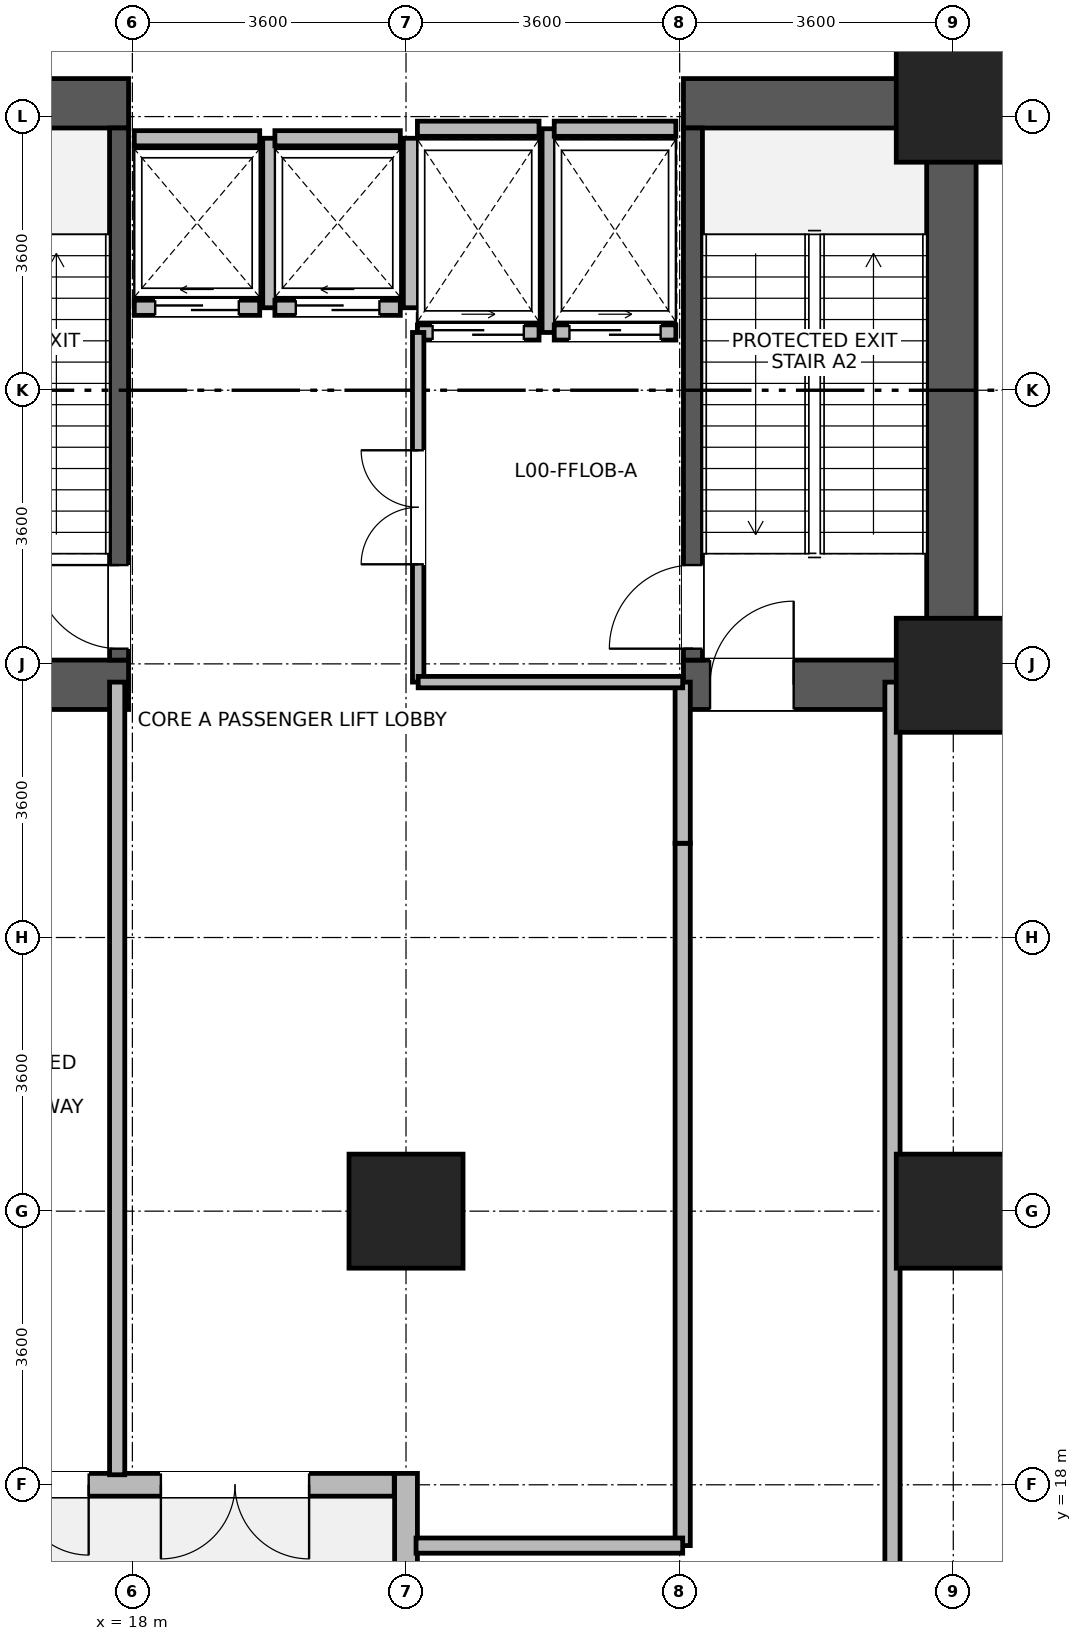
"""IFC4 building model, lengths in metres.
Left out: names, types, materials, properties, quantities, classifications, styles, units other than length and angle.
Written with IfcOpenShell. Run it as: python <this file> out.ifc"""

import sys

from ifc_helpers import new_model, si_unit, direction, frame, frame_2d, origin, origin_2d, place, context, subcontext, project, spatial, rectangle, extrude, source, transform, mapped, element, fill, save


model = new_model("IFC4")
c1 = context("Model", 3, precision=1e-05, world=origin(), true_north=direction((0.0, 1.0)))
c2 = subcontext(c1, "Body", "Model", "MODEL_VIEW")
j1 = project(units=[si_unit("LENGTHUNIT", "METRE"), si_unit("PLANEANGLEUNIT", "RADIAN")], contexts=[c1])
p1 = place(None, origin())
s1 = spatial("IfcSite", under=j1, at=p1, CompositionType="ELEMENT")
p2 = place(p1, origin())
s2 = spatial("IfcBuilding", under=s1, at=p2, CompositionType="ELEMENT")
p3 = place(p2, origin())
s3 = spatial("IfcBuildingStorey", under=s2, at=p3, CompositionType="ELEMENT", Elevation=0.0)
p4 = place(p3, frame((28.775, 28.2, 0.0), z_axis=(0.0, 0.0, 1.0), x_axis=(0.0, 1.0, 0.0)))
e1 = element("IfcWall", 1, at=p4, inside=s3, PredefinedType="SHEAR", context=c2, shape_type="SweptSolid", body=[
    extrude(rectangle(XDim=8.3, YDim=0.65, at=frame_2d((4.15, 0.0))), origin(), (0.0, 0.0, 1.0), 5.12),
])
p5 = place(p3, frame((14.75, 28.525, 0.0), z_axis=(0.0, 0.0, 1.0), x_axis=(1.0, 0.0, 0.0)))
e2 = element("IfcWall", 2, at=p5, inside=s3, PredefinedType="SHEAR", context=c2, shape_type="SweptSolid", body=[
    extrude(rectangle(XDim=3.2, YDim=0.65, at=frame_2d((1.6, 0.0))), origin(), (0.0, 0.0, 1.0), 5.12),
])
p6 = place(p5, frame((0.85, 0.0, 0.0)))
e3 = element("IfcOpeningElement", 3, at=p6, cuts=e2, PredefinedType="OPENING", context=c2, shape_type="SweptSolid", body=[
    extrude(rectangle(XDim=1.1, YDim=2.08, at=frame_2d((0.55, 1.04))), frame((0.0, 0.335, 0.0), z_axis=(0.0, -1.0, 0.0), x_axis=(1.0, 0.0, 0.0)), (0.0, 0.0, 1.0), 0.67),
])
p7 = place(p3, frame((25.25, 28.525, 0.0), z_axis=(0.0, 0.0, 1.0), x_axis=(1.0, 0.0, 0.0)))
e4 = element("IfcWall", 4, at=p7, inside=s3, PredefinedType="SHEAR", context=c2, shape_type="SweptSolid", body=[
    extrude(rectangle(XDim=3.2, YDim=0.65, at=frame_2d((1.6, 0.0))), origin(), (0.0, 0.0, 1.0), 5.12),
])
p8 = place(p7, frame((0.35, 0.0, 0.0)))
e5 = element("IfcOpeningElement", 5, at=p8, cuts=e4, PredefinedType="OPENING", context=c2, shape_type="SweptSolid", body=[
    extrude(rectangle(XDim=1.1, YDim=2.08, at=frame_2d((0.55, 1.04))), frame((0.0, 0.335, 0.0), z_axis=(0.0, -1.0, 0.0), x_axis=(1.0, 0.0, 0.0)), (0.0, 0.0, 1.0), 0.67),
])
for number, where, z_axis, x_axis in (
    (6, (14.75, 36.175, 0.0), (0.0, 0.0, 1.0), (1.0, 0.0, 0.0)),
    (7, (25.25, 36.175, 0.0), (0.0, 0.0, 1.0), (1.0, 0.0, 0.0)),
):
    element("IfcWall", number, at=place(p3, frame(where, z_axis=z_axis, x_axis=x_axis)), inside=s3, PredefinedType="SHEAR", context=c2, shape_type="SweptSolid", body=[
        extrude(rectangle(XDim=3.2, YDim=0.65, at=frame_2d((1.6, 0.0))), origin(), (0.0, 0.0, 1.0), 5.12),
    ])
p9 = place(p3, frame((17.825, 28.85, 0.0), z_axis=(0.0, 0.0, 1.0), x_axis=(0.0, 1.0, 0.0)))
e8 = element("IfcWall", 8, at=p9, inside=s3, PredefinedType="SHEAR", context=c2, shape_type="SweptSolid", body=[
    extrude(rectangle(XDim=7.0, YDim=0.25, at=frame_2d((3.5, 0.0))), origin(), (0.0, 0.0, 1.0), 5.12),
])
p10 = place(p9, frame((0.15, 0.0, 0.0)))
e9 = element("IfcOpeningElement", 9, at=p10, cuts=e8, PredefinedType="OPENING", context=c2, shape_type="SweptSolid", body=[
    extrude(rectangle(XDim=1.1, YDim=2.08, at=frame_2d((0.55, 1.04))), frame((0.0, 0.135, 0.0), z_axis=(0.0, -1.0, 0.0), x_axis=(1.0, 0.0, 0.0)), (0.0, 0.0, 1.0), 0.27),
])
p11 = place(p3, frame((25.375, 28.85, 0.0), z_axis=(0.0, 0.0, 1.0), x_axis=(0.0, 1.0, 0.0)))
e10 = element("IfcWall", 10, at=p11, inside=s3, PredefinedType="SHEAR", context=c2, shape_type="SweptSolid", body=[
    extrude(rectangle(XDim=7.0, YDim=0.25, at=frame_2d((3.5, 0.0))), origin(), (0.0, 0.0, 1.0), 5.12),
])
p12 = place(p11, frame((0.15, 0.0, 0.0)))
e11 = element("IfcOpeningElement", 11, at=p12, cuts=e10, PredefinedType="OPENING", context=c2, shape_type="SweptSolid", body=[
    extrude(rectangle(XDim=1.1, YDim=2.08, at=frame_2d((0.55, 1.04))), frame((0.0, 0.135, 0.0), z_axis=(0.0, -1.0, 0.0), x_axis=(1.0, 0.0, 0.0)), (0.0, 0.0, 1.0), 0.27),
])
m1 = source(origin(), c2, "Body", "SweptSolid", [
    extrude(rectangle(XDim=1.5, YDim=1.5, at=origin_2d()), origin(), (0.0, 0.0, 1.0), 5.4),
])
for number, where, z_axis, x_axis in (
    (12, (21.6, 21.6, 0.0), (0.0, 0.0, 1.0), (1.0, 0.0, 0.0)),
    (13, (28.8, 21.6, 0.0), (0.0, 0.0, 1.0), (1.0, 0.0, 0.0)),
    (14, (28.8, 28.65, 0.0), (0.0, 0.0, 1.0), (1.0, 0.0, 0.0)),
    (15, (28.8, 36.15, 0.0), (0.0, 0.0, 1.0), (1.0, 0.0, 0.0)),
):
    element("IfcColumn", number, at=place(p3, frame(where, z_axis=z_axis, x_axis=x_axis)), inside=s3, PredefinedType="COLUMN", context=c2, shape_type="MappedRepresentation", body=[
        mapped(m1, transform((0.0, 0.0, 0.0), x_axis=(1.0, 0.0, 0.0), y_axis=(0.0, 1.0, 0.0), z_axis=(0.0, 0.0, 1.0), scale=1.0)),
    ])
p13 = place(p3, frame((21.445, 18.0, 0.0), z_axis=(0.0, 0.0, 1.0), x_axis=(-1.0, 0.0, 0.0)))
e16 = element("IfcWall", 16, at=p13, inside=s3, PredefinedType="STANDARD", context=c2, shape_type="SweptSolid", body=[
    extrude(rectangle(XDim=20.294, YDim=0.3, at=frame_2d((10.147, 0.0))), origin(), (0.0, 0.0, 1.0), 5.1),
])
p14 = place(p13, frame((4.02, 0.0, 0.0)))
e17 = element("IfcOpeningElement", 17, at=p14, cuts=e16, PredefinedType="OPENING", context=c2, shape_type="SweptSolid", body=[
    extrude(rectangle(XDim=1.85, YDim=2.25, at=frame_2d((0.925, 1.125))), frame((0.0, 0.16, 0.0), z_axis=(0.0, -1.0, 0.0), x_axis=(1.0, 0.0, 0.0)), (0.0, 0.0, 1.0), 0.32),
])
p15 = place(p13, frame((1.12, 0.0, 0.0)))
e18 = element("IfcOpeningElement", 18, at=p15, cuts=e16, PredefinedType="OPENING", context=c2, shape_type="SweptSolid", body=[
    extrude(rectangle(XDim=1.95, YDim=2.4, at=frame_2d((0.975, 1.2))), frame((0.0, 0.16, 0.0), z_axis=(0.0, -1.0, 0.0), x_axis=(1.0, 0.0, 0.0)), (0.0, 0.0, 1.0), 0.32),
])
p16 = place(p13, frame((7.256, 0.0, 0.9)))
e19 = element("IfcOpeningElement", 19, at=p16, cuts=e16, PredefinedType="OPENING", context=c2, shape_type="SweptSolid", body=[
    extrude(rectangle(XDim=2.4, YDim=2.5, at=frame_2d((1.2, 1.25))), frame((0.0, 0.16, 0.0), z_axis=(0.0, -1.0, 0.0), x_axis=(1.0, 0.0, 0.0)), (0.0, 0.0, 1.0), 0.32),
])
p17 = place(p13, frame((14.021, 0.0, 0.9)))
e20 = element("IfcOpeningElement", 20, at=p17, cuts=e16, PredefinedType="OPENING", context=c2, shape_type="SweptSolid", body=[
    extrude(rectangle(XDim=2.4, YDim=2.5, at=frame_2d((1.2, 1.25))), frame((0.0, 0.16, 0.0), z_axis=(0.0, -1.0, 0.0), x_axis=(1.0, 0.0, 0.0)), (0.0, 0.0, 1.0), 0.32),
])
p18 = place(p13, frame((17.403, 0.0, 0.9)))
e21 = element("IfcOpeningElement", 21, at=p18, cuts=e16, PredefinedType="OPENING", context=c2, shape_type="SweptSolid", body=[
    extrude(rectangle(XDim=2.4, YDim=2.5, at=frame_2d((1.2, 1.25))), frame((0.0, 0.16, 0.0), z_axis=(0.0, -1.0, 0.0), x_axis=(1.0, 0.0, 0.0)), (0.0, 0.0, 1.0), 0.32),
])
p19 = place(p3, frame((21.6, 1.65, 0.0), z_axis=(0.0, 0.0, 1.0), x_axis=(0.0, 1.0, 0.0)))
e22 = element("IfcWall", 22, at=p19, inside=s3, PredefinedType="STANDARD", context=c2, shape_type="SweptSolid", body=[
    extrude(rectangle(XDim=16.5, YDim=0.3, at=frame_2d((8.25, 0.0))), origin(), (0.0, 0.0, 1.0), 5.1),
])
p20 = place(p19, frame((13.125, 0.0, 0.0)))
e23 = element("IfcOpeningElement", 23, at=p20, cuts=e22, PredefinedType="OPENING", context=c2, shape_type="SweptSolid", body=[
    extrude(rectangle(XDim=1.85, YDim=2.25, at=frame_2d((0.925, 1.125))), frame((0.0, 0.16, 0.0), z_axis=(0.0, -1.0, 0.0), x_axis=(1.0, 0.0, 0.0)), (0.0, 0.0, 1.0), 0.32),
])
p21 = place(p19, frame((0.45, 0.0, 0.9)))
e24 = element("IfcOpeningElement", 24, at=p21, cuts=e22, PredefinedType="OPENING", context=c2, shape_type="SweptSolid", body=[
    extrude(rectangle(XDim=2.4, YDim=2.5, at=frame_2d((1.2, 1.25))), frame((0.0, 0.16, 0.0), z_axis=(0.0, -1.0, 0.0), x_axis=(1.0, 0.0, 0.0)), (0.0, 0.0, 1.0), 0.32),
])
p22 = place(p19, frame((7.05, 0.0, 0.9)))
e25 = element("IfcOpeningElement", 25, at=p22, cuts=e22, PredefinedType="OPENING", context=c2, shape_type="SweptSolid", body=[
    extrude(rectangle(XDim=2.4, YDim=2.5, at=frame_2d((1.2, 1.25))), frame((0.0, 0.16, 0.0), z_axis=(0.0, -1.0, 0.0), x_axis=(1.0, 0.0, 0.0)), (0.0, 0.0, 1.0), 0.32),
])
p23 = place(p3, frame((18.025, 33.485, 0.0), z_axis=(0.0, 0.0, 1.0), x_axis=(1.0, 0.0, 0.0)))
e26 = element("IfcWall", 26, at=p23, inside=s3, PredefinedType="PARTITIONING", context=c2, shape_type="SweptSolid", body=[
    extrude(rectangle(XDim=1.65, YDim=0.2, at=frame_2d((0.825, 0.0))), origin(), (0.0, 0.0, 1.0), 5.1),
])
p24 = place(p23, frame((0.275, 0.0, 0.0)))
e27 = element("IfcOpeningElement", 27, at=p24, cuts=e26, PredefinedType="OPENING", context=c2, shape_type="SweptSolid", body=[
    extrude(rectangle(XDim=1.1, YDim=2.12, at=frame_2d((0.55, 1.06))), frame((0.0, 0.11, 0.0), z_axis=(0.0, -1.0, 0.0), x_axis=(1.0, 0.0, 0.0)), (0.0, 0.0, 1.0), 0.22),
])
p25 = place(p3, frame((18.025, 35.715, 0.0), z_axis=(0.0, 0.0, 1.0), x_axis=(1.0, 0.0, 0.0)))
e28 = element("IfcWall", 28, at=p25, inside=s3, PredefinedType="PARTITIONING", context=c2, shape_type="SweptSolid", body=[
    extrude(rectangle(XDim=1.65, YDim=0.2, at=frame_2d((0.825, 0.0))), origin(), (0.0, 0.0, 1.0), 5.1),
])
p26 = place(p3, frame((19.815, 33.485, 0.0), z_axis=(0.0, 0.0, 1.0), x_axis=(0.0, 1.0, 0.0)))
e29 = element("IfcWall", 29, at=p26, inside=s3, PredefinedType="PARTITIONING", context=c2, shape_type="SweptSolid", body=[
    extrude(rectangle(XDim=2.23, YDim=0.2, at=frame_2d((1.115, 0.0))), origin(), (0.0, 0.0, 1.0), 5.1),
])
p27 = place(p3, frame((19.875, 33.485, 0.0), z_axis=(0.0, 0.0, 1.0), x_axis=(1.0, 0.0, 0.0)))
e30 = element("IfcWall", 30, at=p27, inside=s3, PredefinedType="PARTITIONING", context=c2, shape_type="SweptSolid", body=[
    extrude(rectangle(XDim=1.65, YDim=0.2, at=frame_2d((0.825, 0.0))), origin(), (0.0, 0.0, 1.0), 5.1),
])
p28 = place(p27, frame((0.275, 0.0, 0.0)))
e31 = element("IfcOpeningElement", 31, at=p28, cuts=e30, PredefinedType="OPENING", context=c2, shape_type="SweptSolid", body=[
    extrude(rectangle(XDim=1.1, YDim=2.12, at=frame_2d((0.55, 1.06))), frame((0.0, 0.11, 0.0), z_axis=(0.0, -1.0, 0.0), x_axis=(1.0, 0.0, 0.0)), (0.0, 0.0, 1.0), 0.22),
])
p29 = place(p3, frame((19.875, 35.715, 0.0), z_axis=(0.0, 0.0, 1.0), x_axis=(1.0, 0.0, 0.0)))
e32 = element("IfcWall", 32, at=p29, inside=s3, PredefinedType="PARTITIONING", context=c2, shape_type="SweptSolid", body=[
    extrude(rectangle(XDim=1.65, YDim=0.2, at=frame_2d((0.825, 0.0))), origin(), (0.0, 0.0, 1.0), 5.1),
])
p30 = place(p3, frame((21.665, 33.485, 0.0), z_axis=(0.0, 0.0, 1.0), x_axis=(0.0, 1.0, 0.0)))
e33 = element("IfcWall", 33, at=p30, inside=s3, PredefinedType="PARTITIONING", context=c2, shape_type="SweptSolid", body=[
    extrude(rectangle(XDim=2.23, YDim=0.2, at=frame_2d((1.115, 0.0))), origin(), (0.0, 0.0, 1.0), 5.1),
])
p31 = place(p3, frame((21.75, 33.16, 0.0), z_axis=(0.0, 0.0, 1.0), x_axis=(1.0, 0.0, 0.0)))
e34 = element("IfcWall", 34, at=p31, inside=s3, PredefinedType="PARTITIONING", context=c2, shape_type="SweptSolid", body=[
    extrude(rectangle(XDim=1.6, YDim=0.2, at=frame_2d((0.8, 0.0))), origin(), (0.0, 0.0, 1.0), 5.1),
])
p32 = place(p31, frame((0.2, 0.0, 0.0)))
e35 = element("IfcOpeningElement", 35, at=p32, cuts=e34, PredefinedType="OPENING", context=c2, shape_type="SweptSolid", body=[
    extrude(rectangle(XDim=1.2, YDim=2.12, at=frame_2d((0.6, 1.06))), frame((0.0, 0.11, 0.0), z_axis=(0.0, -1.0, 0.0), x_axis=(1.0, 0.0, 0.0)), (0.0, 0.0, 1.0), 0.22),
])
p33 = place(p3, frame((21.75, 35.84, 0.0), z_axis=(0.0, 0.0, 1.0), x_axis=(1.0, 0.0, 0.0)))
e36 = element("IfcWall", 36, at=p33, inside=s3, PredefinedType="PARTITIONING", context=c2, shape_type="SweptSolid", body=[
    extrude(rectangle(XDim=1.6, YDim=0.2, at=frame_2d((0.8, 0.0))), origin(), (0.0, 0.0, 1.0), 3.9),
])
p34 = place(p3, frame((23.49, 33.16, 0.0), z_axis=(0.0, 0.0, 1.0), x_axis=(0.0, 1.0, 0.0)))
e37 = element("IfcWall", 37, at=p34, inside=s3, PredefinedType="PARTITIONING", context=c2, shape_type="SweptSolid", body=[
    extrude(rectangle(XDim=2.68, YDim=0.2, at=frame_2d((1.34, 0.0))), origin(), (0.0, 0.0, 1.0), 5.1),
])
p35 = place(p3, frame((23.55, 33.16, 0.0), z_axis=(0.0, 0.0, 1.0), x_axis=(1.0, 0.0, 0.0)))
e38 = element("IfcWall", 38, at=p35, inside=s3, PredefinedType="PARTITIONING", context=c2, shape_type="SweptSolid", body=[
    extrude(rectangle(XDim=1.6, YDim=0.2, at=frame_2d((0.8, 0.0))), origin(), (0.0, 0.0, 1.0), 5.1),
])
p36 = place(p35, frame((0.2, 0.0, 0.0)))
e39 = element("IfcOpeningElement", 39, at=p36, cuts=e38, PredefinedType="OPENING", context=c2, shape_type="SweptSolid", body=[
    extrude(rectangle(XDim=1.2, YDim=2.12, at=frame_2d((0.6, 1.06))), frame((0.0, 0.11, 0.0), z_axis=(0.0, -1.0, 0.0), x_axis=(1.0, 0.0, 0.0)), (0.0, 0.0, 1.0), 0.22),
])
p37 = place(p3, frame((23.55, 35.84, 0.0), z_axis=(0.0, 0.0, 1.0), x_axis=(1.0, 0.0, 0.0)))
e40 = element("IfcWall", 40, at=p37, inside=s3, PredefinedType="PARTITIONING", context=c2, shape_type="SweptSolid", body=[
    extrude(rectangle(XDim=1.6, YDim=0.2, at=frame_2d((0.8, 0.0))), origin(), (0.0, 0.0, 1.0), 3.9),
])
p38 = place(p3, frame((28.0, 14.2, 0.0), z_axis=(0.0, 0.0, 1.0), x_axis=(0.0, 1.0, 0.0)))
e41 = element("IfcWall", 41, at=p38, inside=s3, PredefinedType="PARTITIONING", context=c2, shape_type="SweptSolid", body=[
    extrude(rectangle(XDim=14.36, YDim=0.2, at=frame_2d((7.18, 0.0))), origin(), (0.0, 0.0, 1.0), 5.1),
])
p39 = place(p3, frame((17.8, 18.132, 0.0), z_axis=(0.0, 0.0, 1.0), x_axis=(0.0, 1.0, 0.0)))
e42 = element("IfcWall", 42, at=p39, inside=s3, PredefinedType="PARTITIONING", context=c2, shape_type="SweptSolid", body=[
    extrude(rectangle(XDim=10.428, YDim=0.2, at=frame_2d((5.214, 0.0))), origin(), (0.0, 0.0, 1.0), 5.1),
])
p40 = place(p3, frame((25.24, 17.2, 0.0), z_axis=(0.0, 0.0, 1.0), x_axis=(0.0, 1.0, 0.0)))
e43 = element("IfcWall", 43, at=p40, inside=s3, PredefinedType="PARTITIONING", context=c2, shape_type="SweptSolid", body=[
    extrude(rectangle(XDim=9.24, YDim=0.2, at=frame_2d((4.62, 0.0))), origin(), (0.0, 0.0, 1.0), 5.1),
])
p41 = place(p3, frame((21.732, 17.2, 0.0), z_axis=(0.0, 0.0, 1.0), x_axis=(1.0, 0.0, 0.0)))
e44 = element("IfcWall", 44, at=p41, inside=s3, PredefinedType="PARTITIONING", context=c2, shape_type="SweptSolid", body=[
    extrude(rectangle(XDim=3.508, YDim=0.2, at=frame_2d((1.754, 0.0))), origin(), (0.0, 0.0, 1.0), 5.1),
])
p42 = place(p3, frame((25.24, 26.44, 0.0), z_axis=(0.0, 0.0, 1.0), x_axis=(0.0, 1.0, 0.0)))
e45 = element("IfcWall", 45, at=p42, inside=s3, PredefinedType="PARTITIONING", context=c2, shape_type="SweptSolid", body=[
    extrude(rectangle(XDim=2.12, YDim=0.2, at=frame_2d((1.06, 0.0))), origin(), (0.0, 0.0, 1.0), 5.1),
])
p43 = place(p3, frame((21.76, 28.56, 0.0), z_axis=(0.0, 0.0, 1.0), x_axis=(0.0, 1.0, 0.0)))
e46 = element("IfcWall", 46, at=p43, inside=s3, PredefinedType="PARTITIONING", context=c2, shape_type="SweptSolid", body=[
    extrude(rectangle(XDim=4.6, YDim=0.15, at=frame_2d((2.3, 0.0))), origin(), (0.0, 0.0, 1.0), 5.1),
])
p44 = place(p43, frame((1.55, 0.0, 0.0)))
e47 = element("IfcOpeningElement", 47, at=p44, cuts=e46, PredefinedType="OPENING", context=c2, shape_type="SweptSolid", body=[
    extrude(rectangle(XDim=1.5, YDim=2.1, at=frame_2d((0.75, 1.05))), frame((0.0, 0.085, 0.0), z_axis=(0.0, -1.0, 0.0), x_axis=(1.0, 0.0, 0.0)), (0.0, 0.0, 1.0), 0.17),
])
p45 = place(p3, frame((21.76, 28.56, 0.0), z_axis=(0.0, 0.0, 1.0), x_axis=(1.0, 0.0, 0.0)))
e48 = element("IfcWall", 48, at=p45, inside=s3, PredefinedType="PARTITIONING", context=c2, shape_type="SweptSolid", body=[
    extrude(rectangle(XDim=3.48, YDim=0.15, at=frame_2d((1.74, 0.0))), origin(), (0.0, 0.0, 1.0), 3.9),
])
p46 = place(p14, origin())
e49 = element("IfcDoor", 49, at=p46, inside=s3, OperationType="DOUBLE_DOOR_SINGLE_SWING", PredefinedType="DOOR", context=c2, shape_type="SweptSolid", body=[
    extrude(rectangle(XDim=1.85, YDim=2.25, at=frame_2d((0.925, 1.125))), frame((0.0, 0.025, 0.0), z_axis=(0.0, -1.0, 0.0), x_axis=(1.0, 0.0, 0.0)), (0.0, 0.0, 1.0), 0.05),
])
fill(e17, e49)
p47 = place(p15, origin())
e50 = element("IfcDoor", 50, at=p47, inside=s3, OperationType="DOUBLE_DOOR_SINGLE_SWING", PredefinedType="DOOR", context=c2, shape_type="SweptSolid", body=[
    extrude(rectangle(XDim=1.95, YDim=2.4, at=frame_2d((0.975, 1.2))), frame((0.0, 0.025, 0.0), z_axis=(0.0, -1.0, 0.0), x_axis=(1.0, 0.0, 0.0)), (0.0, 0.0, 1.0), 0.05),
])
fill(e18, e50)
p48 = place(p10, origin())
e51 = element("IfcDoor", 51, at=p48, inside=s3, OperationType="SINGLE_SWING_RIGHT", PredefinedType="DOOR", context=c2, shape_type="SweptSolid", body=[
    extrude(rectangle(XDim=1.1, YDim=2.08, at=frame_2d((0.55, 1.04))), frame((0.0, 0.025, 0.0), z_axis=(0.0, -1.0, 0.0), x_axis=(1.0, 0.0, 0.0)), (0.0, 0.0, 1.0), 0.05),
])
fill(e9, e51)
p49 = place(p12, origin())
e52 = element("IfcDoor", 52, at=p49, inside=s3, OperationType="SINGLE_SWING_LEFT", PredefinedType="DOOR", context=c2, shape_type="SweptSolid", body=[
    extrude(rectangle(XDim=1.1, YDim=2.08, at=frame_2d((0.55, 1.04))), frame((0.0, 0.025, 0.0), z_axis=(0.0, -1.0, 0.0), x_axis=(1.0, 0.0, 0.0)), (0.0, 0.0, 1.0), 0.05),
])
fill(e11, e52)
p50 = place(p8, origin())
e53 = element("IfcDoor", 53, at=p50, inside=s3, OperationType="SINGLE_SWING_RIGHT", PredefinedType="DOOR", context=c2, shape_type="SweptSolid", body=[
    extrude(rectangle(XDim=1.1, YDim=2.08, at=frame_2d((0.55, 1.04))), frame((0.0, 0.025, 0.0), z_axis=(0.0, -1.0, 0.0), x_axis=(1.0, 0.0, 0.0)), (0.0, 0.0, 1.0), 0.05),
])
fill(e5, e53)
p51 = place(p24, origin())
e54 = element("IfcDoor", 54, at=p51, inside=s3, OperationType="SLIDING_TO_LEFT", PredefinedType="DOOR", context=c2, shape_type="SweptSolid", body=[
    extrude(rectangle(XDim=1.1, YDim=2.12, at=frame_2d((0.55, 1.06))), frame((0.0, 0.025, 0.0), z_axis=(0.0, -1.0, 0.0), x_axis=(1.0, 0.0, 0.0)), (0.0, 0.0, 1.0), 0.05),
])
fill(e27, e54)
p52 = place(p28, origin())
e55 = element("IfcDoor", 55, at=p52, inside=s3, OperationType="SLIDING_TO_LEFT", PredefinedType="DOOR", context=c2, shape_type="SweptSolid", body=[
    extrude(rectangle(XDim=1.1, YDim=2.12, at=frame_2d((0.55, 1.06))), frame((0.0, 0.025, 0.0), z_axis=(0.0, -1.0, 0.0), x_axis=(1.0, 0.0, 0.0)), (0.0, 0.0, 1.0), 0.05),
])
fill(e31, e55)
p53 = place(p32, origin())
e56 = element("IfcDoor", 56, at=p53, inside=s3, OperationType="SLIDING_TO_RIGHT", PredefinedType="DOOR", context=c2, shape_type="SweptSolid", body=[
    extrude(rectangle(XDim=1.2, YDim=2.12, at=frame_2d((0.6, 1.06))), frame((0.0, 0.025, 0.0), z_axis=(0.0, -1.0, 0.0), x_axis=(1.0, 0.0, 0.0)), (0.0, 0.0, 1.0), 0.05),
])
fill(e35, e56)
p54 = place(p36, origin())
e57 = element("IfcDoor", 57, at=p54, inside=s3, OperationType="SLIDING_TO_RIGHT", PredefinedType="DOOR", context=c2, shape_type="SweptSolid", body=[
    extrude(rectangle(XDim=1.2, YDim=2.12, at=frame_2d((0.6, 1.06))), frame((0.0, 0.025, 0.0), z_axis=(0.0, -1.0, 0.0), x_axis=(1.0, 0.0, 0.0)), (0.0, 0.0, 1.0), 0.05),
])
fill(e39, e57)
p55 = place(p44, origin())
e58 = element("IfcDoor", 58, at=p55, inside=s3, OperationType="DOUBLE_DOOR_SINGLE_SWING", PredefinedType="DOOR", context=c2, shape_type="SweptSolid", body=[
    extrude(rectangle(XDim=1.5, YDim=2.1, at=frame_2d((0.75, 1.05))), frame((0.0, 0.025, 0.0), z_axis=(0.0, -1.0, 0.0), x_axis=(1.0, 0.0, 0.0)), (0.0, 0.0, 1.0), 0.05),
])
fill(e47, e58)
save(model, sys.argv[1])
